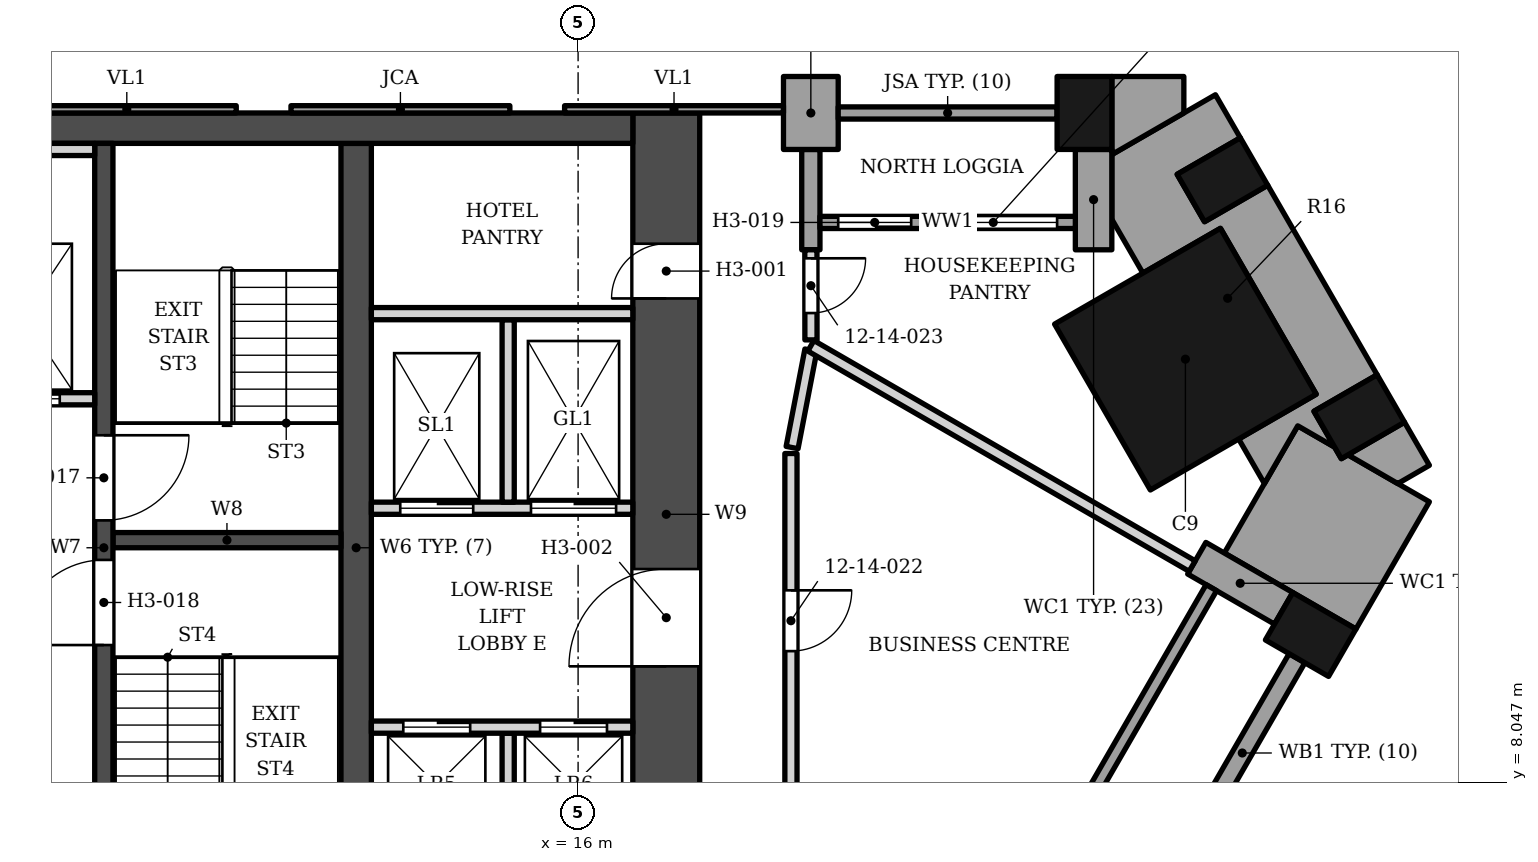
"""IFC4 building model, lengths in metres.
Left out: names, types, materials, properties, quantities, classifications, styles, units other than length and angle.
Written with IfcOpenShell. Run it as: python <this file> out.ifc"""

import sys

from ifc_helpers import new_model, si_unit, direction, frame, frame_2d, origin, origin_2d, place, context, subcontext, project, spatial, polyline, rectangle, outline, extrude, element, fill, save


model = new_model("IFC4")
c1 = context("Model", 3, precision=1e-05, world=origin(), true_north=direction((0.0, 1.0)))
c2 = subcontext(c1, "Body", "Model", "MODEL_VIEW")
j1 = project(units=[si_unit("LENGTHUNIT", "METRE"), si_unit("PLANEANGLEUNIT", "RADIAN")], contexts=[c1])
p1 = place(None, origin())
s1 = spatial("IfcSite", under=j1, at=p1, CompositionType="ELEMENT")
p2 = place(p1, origin())
s2 = spatial("IfcBuilding", under=s1, at=p2, CompositionType="ELEMENT")
p3 = place(p2, frame((0.0, 0.0, 66.4)))
s3 = spatial("IfcBuildingStorey", under=s2, at=p3, CompositionType="ELEMENT", Elevation=66.4)
p4 = place(p3, frame((-16.9, 18.802, 0.0), z_axis=(0.0, 0.0, 1.0), x_axis=(1.0, 0.0, 0.0)))
e1 = element("IfcWall", 1, at=p4, inside=s3, PredefinedType="SHEAR", context=c2, shape_type="SweptSolid", body=[
    extrude(rectangle(XDim=33.8, YDim=0.5, at=frame_2d((16.9, 0.0))), origin(), (0.0, 0.0, 1.0), 3.4),
])
p5 = place(p3, frame((12.35, 5.253, 0.0), z_axis=(0.0, 0.0, 1.0), x_axis=(0.0, 1.0, 0.0)))
e2 = element("IfcWall", 2, at=p5, inside=s3, PredefinedType="SHEAR", context=c2, shape_type="SweptSolid", body=[
    extrude(rectangle(XDim=13.3, YDim=0.5, at=frame_2d((6.65, 0.0))), origin(), (0.0, 0.0, 1.0), 3.4),
])
p6 = place(p3, frame((8.2, 5.253, 0.0), z_axis=(0.0, 0.0, 1.0), x_axis=(0.0, 1.0, 0.0)))
e3 = element("IfcWall", 3, at=p6, inside=s3, PredefinedType="SHEAR", context=c2, shape_type="SweptSolid", body=[
    extrude(rectangle(XDim=13.3, YDim=0.3, at=frame_2d((6.65, 0.0))), origin(), (0.0, 0.0, 1.0), 3.4),
])
p7 = place(p6, frame((7.1, 0.0, 0.0)))
e4 = element("IfcOpeningElement", 4, at=p7, cuts=e3, PredefinedType="OPENING", context=c2, shape_type="SweptSolid", body=[
    extrude(rectangle(XDim=1.4, YDim=2.1, at=frame_2d((0.7, 1.05))), frame((0.0, 0.16, 0.0), z_axis=(0.0, -1.0, 0.0), x_axis=(1.0, 0.0, 0.0)), (0.0, 0.0, 1.0), 0.32),
])
p8 = place(p6, frame((5.05, 0.0, 0.0)))
e5 = element("IfcOpeningElement", 5, at=p8, cuts=e3, PredefinedType="OPENING", context=c2, shape_type="SweptSolid", body=[
    extrude(rectangle(XDim=1.4, YDim=2.1, at=frame_2d((0.7, 1.05))), frame((0.0, 0.16, 0.0), z_axis=(0.0, -1.0, 0.0), x_axis=(1.0, 0.0, 0.0)), (0.0, 0.0, 1.0), 0.32),
])
p9 = place(p3, frame((8.35, 12.028, 0.0), z_axis=(0.0, 0.0, 1.0), x_axis=(1.0, 0.0, 0.0)))
e6 = element("IfcWall", 6, at=p9, inside=s3, PredefinedType="SHEAR", context=c2, shape_type="SweptSolid", body=[
    extrude(rectangle(XDim=3.75, YDim=0.25, at=frame_2d((1.875, 0.0))), origin(), (0.0, 0.0, 1.0), 3.4),
])
p10 = place(p3, frame((17.45, 5.853, 0.0), z_axis=(0.0, 0.0, 1.0), x_axis=(0.0, 1.0, 0.0)))
e7 = element("IfcWall", 7, at=p10, inside=s3, PredefinedType="SHEAR", context=c2, shape_type="SweptSolid", body=[
    extrude(rectangle(XDim=13.2, YDim=1.1, at=frame_2d((6.6, 0.0))), origin(), (0.0, 0.0, 1.0), 3.4),
])
p11 = place(p10, frame((4.1, 0.0, 0.0)))
e8 = element("IfcOpeningElement", 8, at=p11, cuts=e7, PredefinedType="OPENING", context=c2, shape_type="SweptSolid", body=[
    extrude(rectangle(XDim=1.6, YDim=2.1, at=frame_2d((0.8, 1.05))), frame((0.0, 0.56, 0.0), z_axis=(0.0, -1.0, 0.0), x_axis=(1.0, 0.0, 0.0)), (0.0, 0.0, 1.0), 1.12),
])
p12 = place(p10, frame((10.15, 0.0, 0.0)))
e9 = element("IfcOpeningElement", 9, at=p12, cuts=e7, PredefinedType="OPENING", context=c2, shape_type="SweptSolid", body=[
    extrude(rectangle(XDim=0.9, YDim=2.1, at=frame_2d((0.45, 1.05))), frame((0.0, 0.56, 0.0), z_axis=(0.0, -1.0, 0.0), x_axis=(1.0, 0.0, 0.0)), (0.0, 0.0, 1.0), 1.12),
])
p13 = place(p3, frame((25.988, 15.004, 0.0), z_axis=(0.0, 0.0, 1.0), x_axis=(-0.866025412511, -0.499999984885, 0.0)))
e10 = element("IfcColumn", 10, at=p13, inside=s3, PredefinedType="COLUMN", context=c2, shape_type="SweptSolid", body=[
    extrude(rectangle(XDim=3.15, YDim=3.15, at=origin_2d()), origin(), (0.0, 0.0, 1.0), 3.4),
])
for number, where, z_axis, x_axis in (
    (11, (28.048, 10.476, 0.0), (0.0, 0.0, 1.0), (0.5, 0.866, 0.0)),
    (12, (28.847, 14.057, 0.0), (0.0, 0.0, 1.0), (-0.5, 0.866, 0.0)),
    (13, (26.597, 17.954, 0.0), (0.0, 0.0, 1.0), (-0.5, 0.866, 0.0)),
    (14, (24.328, 19.053, 0.0), (0.0, 0.0, 1.0), (-1.0, 0.0, 0.0)),
):
    element("IfcColumn", number, at=place(p3, frame(where, z_axis=z_axis, x_axis=x_axis)), inside=s3, PredefinedType="COLUMN", context=c2, shape_type="SweptSolid", body=[
        extrude(rectangle(XDim=0.9, YDim=1.2, at=origin_2d()), origin(), (0.0, 0.0, 1.0), 3.4),
    ])
p14 = place(p3, frame((27.604, 10.906, 0.0), z_axis=(0.0, 0.0, 1.0), x_axis=(-0.866040211805, 0.499974350878, 0.0)))
e15 = element("IfcWall", 15, at=p14, inside=s3, PredefinedType="SOLIDWALL", context=c2, shape_type="SweptSolid", body=[
    extrude(rectangle(XDim=1.65, YDim=0.6, at=frame_2d((0.825, 0.0))), origin(), (0.0, 0.0, 1.0), 2.65),
])
p15 = place(p3, frame((26.023, 6.969, 0.0), z_axis=(0.0, 0.0, 1.0), x_axis=(0.499961193289, 0.866047807691, 0.0)))
e16 = element("IfcWall", 16, at=p15, inside=s3, PredefinedType="SOLIDWALL", context=c2, shape_type="SweptSolid", body=[
    extrude(rectangle(XDim=3.6, YDim=0.3, at=frame_2d((1.8, 0.0))), origin(), (0.0, 0.0, 1.0), 2.63),
])
p16 = place(p3, frame((24.314, 7.609, 0.0), z_axis=(0.0, 0.0, 1.0), x_axis=(0.500027713859, 0.866009402589, 0.0)))
e17 = element("IfcWall", 17, at=p16, inside=s3, PredefinedType="ELEMENTEDWALL", context=c2, shape_type="SweptSolid", body=[
    extrude(rectangle(XDim=4.2, YDim=0.2, at=frame_2d((2.1, 0.0))), origin(), (0.0, 0.0, 1.0), 2.65),
])
p17 = place(p3, origin())
e18 = element("IfcWall", 18, at=p17, inside=s3, PredefinedType="SOLIDWALL", context=c2, shape_type="SweptSolid", body=[
    extrude(outline(polyline([(24.778, 16.802), (24.778, 18.453), (24.178, 18.453), (24.178, 16.802), (24.778, 16.802)])), origin(), (0.0, 0.0, 1.0), 2.65),
])
p18 = place(p3, origin())
e19 = element("IfcWall", 19, at=p18, inside=s3, PredefinedType="SOLIDWALL", context=c2, shape_type="SweptSolid", body=[
    extrude(outline(polyline([(20.278, 19.653), (19.378, 19.653), (19.378, 18.453), (20.278, 18.453), (20.278, 19.653)])), origin(), (0.0, 0.0, 1.0), 2.65),
])
p19 = place(p3, origin())
e20 = element("IfcWall", 20, at=p19, inside=s3, PredefinedType="SOLIDWALL", context=c2, shape_type="SweptSolid", body=[
    extrude(outline(polyline([(19.678, 18.453), (19.678, 16.802), (19.978, 16.802), (19.978, 18.453), (19.678, 18.453)])), origin(), (0.0, 0.0, 1.0), 2.65),
])
p20 = place(p3, frame((23.878, 19.052, 0.0), z_axis=(0.0, 0.0, 1.0), x_axis=(-1.0, 0.0, 0.0)))
e21 = element("IfcWall", 21, at=p20, inside=s3, PredefinedType="SOLIDWALL", context=c2, shape_type="SweptSolid", body=[
    extrude(rectangle(XDim=3.6, YDim=0.2, at=frame_2d((1.8, 0.0))), origin(), (0.0, 0.0, 1.0), 2.65),
])
p21 = place(p3, frame((24.178, 17.252, 0.0), z_axis=(0.0, 0.0, 1.0), x_axis=(-1.0, 0.0, 0.0)))
e22 = element("IfcWall", 22, at=p21, inside=s3, PredefinedType="ELEMENTEDWALL", context=c2, shape_type="SweptSolid", body=[
    extrude(rectangle(XDim=4.2, YDim=0.2, at=frame_2d((2.1, 0.0))), origin(), (0.0, 0.0, 1.0), 2.65),
])
p22 = place(p21, frame((0.3, 0.0, 0.6)))
e23 = element("IfcOpeningElement", 23, at=p22, cuts=e22, PredefinedType="OPENING", context=c2, shape_type="SweptSolid", body=[
    extrude(rectangle(XDim=2.1, YDim=1.8, at=frame_2d((1.05, 0.9))), frame((0.0, 0.11, 0.0), z_axis=(0.0, -1.0, 0.0), x_axis=(1.0, 0.0, 0.0)), (0.0, 0.0, 1.0), 0.22),
])
p23 = place(p21, frame((2.7, 0.0, 0.0)))
e24 = element("IfcOpeningElement", 24, at=p23, cuts=e22, PredefinedType="OPENING", context=c2, shape_type="SweptSolid", body=[
    extrude(rectangle(XDim=1.2, YDim=2.4, at=frame_2d((0.6, 1.2))), frame((0.0, 0.11, 0.0), z_axis=(0.0, -1.0, 0.0), x_axis=(1.0, 0.0, 0.0)), (0.0, 0.0, 1.0), 0.22),
])
p24 = place(p3, origin())
e25 = element("IfcWall", 25, at=p24, inside=s3, PredefinedType="ELEMENTEDWALL", context=c2, shape_type="SweptSolid", body=[
    extrude(outline(polyline([(15.778, 19.173), (15.778, 19.052), (19.377, 19.052), (19.377, 19.173), (15.778, 19.173)])), origin(), (0.0, 0.0, 1.0), 2.65),
])
p25 = place(p3, origin())
e26 = element("IfcWall", 26, at=p25, inside=s3, PredefinedType="SOLIDWALL", context=c2, shape_type="SweptSolid", body=[
    extrude(outline(polyline([(11.278, 19.173), (11.278, 19.052), (14.878, 19.052), (14.878, 19.173), (11.278, 19.173)])), origin(), (0.0, 0.0, 1.0), 2.65),
])
p26 = place(p3, origin())
e27 = element("IfcWall", 27, at=p26, inside=s3, PredefinedType="ELEMENTEDWALL", context=c2, shape_type="SweptSolid", body=[
    extrude(outline(polyline([(6.778, 19.173), (6.778, 19.052), (10.378, 19.052), (10.378, 19.173), (6.778, 19.173)])), origin(), (0.0, 0.0, 1.0), 2.65),
])
p27 = place(p3, origin())
e28 = element("IfcWall", 28, at=p27, inside=s3, PredefinedType="SOLIDWALL", context=c2, shape_type="SweptSolid", body=[
    extrude(outline(polyline([(30.001, 12.658), (28.662, 13.431), (28.552, 13.367), (28.443, 13.558), (27.836, 13.908), (26.628, 11.816), (28.793, 10.566), (30.001, 12.658)])), origin(), (0.0, 0.0, 1.0), 2.63),
])
p28 = place(p3, origin())
e29 = element("IfcWall", 29, at=p28, inside=s3, PredefinedType="SOLIDWALL", context=c2, shape_type="SweptSolid", body=[
    extrude(outline(polyline([(29.481, 12.958), (30.001, 13.258), (29.591, 13.967), (28.662, 13.431), (29.481, 12.958)])), origin(), (0.0, 0.0, 1.0), 2.63),
])
p29 = place(p3, origin())
e30 = element("IfcWall", 30, at=p29, inside=s3, PredefinedType="SOLIDWALL", context=c2, shape_type="SweptSolid", body=[
    extrude(outline(polyline([(25.852, 18.044), (26.891, 18.644), (26.482, 19.353), (24.778, 18.369), (24.778, 17.304), (25.289, 16.419), (26.564, 17.156), (28.139, 14.427), (26.864, 13.691), (27.287, 12.958), (27.836, 13.908), (28.443, 13.558), (28.102, 14.147), (29.141, 14.747), (27.341, 17.864), (26.302, 17.264), (25.852, 18.044)])), origin(), (0.0, 0.0, 1.0), 2.63),
])
p30 = place(p3, origin())
e31 = element("IfcWall", 31, at=p30, inside=s3, PredefinedType="SOLIDWALL", context=c2, shape_type="SweptSolid", body=[
    extrude(outline(polyline([(24.778, 18.453), (24.778, 18.369), (25.962, 19.052), (25.962, 19.653), (24.778, 19.653), (24.778, 18.453), (24.778, 18.453)])), origin(), (0.0, 0.0, 1.0), 2.63),
])
p31 = place(p3, frame((14.85, 6.353, 0.0), z_axis=(0.0, 0.0, 1.0), x_axis=(0.0, 1.0, 0.0)))
e32 = element("IfcWall", 32, at=p31, inside=s3, PredefinedType="SOLIDWALL", context=c2, shape_type="SweptSolid", body=[
    extrude(rectangle(XDim=2.5, YDim=0.2, at=frame_2d((1.25, 0.0))), origin(), (0.0, 0.0, 1.0), 3.23),
])
p32 = place(p3, frame((12.6, 8.953, 0.0), z_axis=(0.0, 0.0, 1.0), x_axis=(1.0, 0.0, 0.0)))
e33 = element("IfcWall", 33, at=p32, inside=s3, PredefinedType="SOLIDWALL", context=c2, shape_type="SweptSolid", body=[
    extrude(rectangle(XDim=4.3, YDim=0.2, at=frame_2d((2.15, 0.0))), origin(), (0.0, 0.0, 1.0), 3.23),
])
p33 = place(p32, frame((0.525, 0.0, 0.0)))
e34 = element("IfcOpeningElement", 34, at=p33, cuts=e33, PredefinedType="OPENING", context=c2, shape_type="SweptSolid", body=[
    extrude(rectangle(XDim=1.1, YDim=2.1, at=frame_2d((0.55, 1.05))), frame((0.0, 0.11, 0.0), z_axis=(0.0, -1.0, 0.0), x_axis=(1.0, 0.0, 0.0)), (0.0, 0.0, 1.0), 0.22),
])
p34 = place(p32, frame((2.775, 0.0, 0.0)))
e35 = element("IfcOpeningElement", 35, at=p34, cuts=e33, PredefinedType="OPENING", context=c2, shape_type="SweptSolid", body=[
    extrude(rectangle(XDim=1.1, YDim=2.1, at=frame_2d((0.55, 1.05))), frame((0.0, 0.11, 0.0), z_axis=(0.0, -1.0, 0.0), x_axis=(1.0, 0.0, 0.0)), (0.0, 0.0, 1.0), 0.22),
])
p35 = place(p3, frame((12.6, 12.552, 0.0), z_axis=(0.0, 0.0, 1.0), x_axis=(1.0, 0.0, 0.0)))
e36 = element("IfcWall", 36, at=p35, inside=s3, PredefinedType="SOLIDWALL", context=c2, shape_type="SweptSolid", body=[
    extrude(rectangle(XDim=4.3, YDim=0.2, at=frame_2d((2.15, 0.0))), origin(), (0.0, 0.0, 1.0), 3.23),
])
p36 = place(p35, frame((0.475, 0.0, 0.0)))
e37 = element("IfcOpeningElement", 37, at=p36, cuts=e36, PredefinedType="OPENING", context=c2, shape_type="SweptSolid", body=[
    extrude(rectangle(XDim=1.2, YDim=2.1, at=frame_2d((0.6, 1.05))), frame((0.0, 0.11, 0.0), z_axis=(0.0, -1.0, 0.0), x_axis=(1.0, 0.0, 0.0)), (0.0, 0.0, 1.0), 0.22),
])
p37 = place(p35, frame((2.625, 0.0, 0.0)))
e38 = element("IfcOpeningElement", 38, at=p37, cuts=e36, PredefinedType="OPENING", context=c2, shape_type="SweptSolid", body=[
    extrude(rectangle(XDim=1.4, YDim=2.1, at=frame_2d((0.7, 1.05))), frame((0.0, 0.11, 0.0), z_axis=(0.0, -1.0, 0.0), x_axis=(1.0, 0.0, 0.0)), (0.0, 0.0, 1.0), 0.22),
])
p38 = place(p3, frame((14.85, 12.653, 0.0), z_axis=(0.0, 0.0, 1.0), x_axis=(0.0, 1.0, 0.0)))
e39 = element("IfcWall", 39, at=p38, inside=s3, PredefinedType="SOLIDWALL", context=c2, shape_type="SweptSolid", body=[
    extrude(rectangle(XDim=3.0, YDim=0.2, at=frame_2d((1.5, 0.0))), origin(), (0.0, 0.0, 1.0), 3.23),
])
p39 = place(p3, frame((5.3, 14.353, 0.0), z_axis=(0.0, 0.0, 1.0), x_axis=(1.0, 0.0, 0.0)))
e40 = element("IfcWall", 40, at=p39, inside=s3, PredefinedType="SOLIDWALL", context=c2, shape_type="SweptSolid", body=[
    extrude(rectangle(XDim=2.75, YDim=0.2, at=frame_2d((1.375, 0.0))), origin(), (0.0, 0.0, 1.0), 3.23),
])
p40 = place(p39, frame((0.975, 0.0, 0.0)))
e41 = element("IfcOpeningElement", 41, at=p40, cuts=e40, PredefinedType="OPENING", context=c2, shape_type="SweptSolid", body=[
    extrude(rectangle(XDim=1.2, YDim=2.1, at=frame_2d((0.6, 1.05))), frame((0.0, 0.11, 0.0), z_axis=(0.0, -1.0, 0.0), x_axis=(1.0, 0.0, 0.0)), (0.0, 0.0, 1.0), 0.22),
])
p41 = place(p3, frame((12.6, 15.753, 0.0), z_axis=(0.0, 0.0, 1.0), x_axis=(1.0, 0.0, 0.0)))
e42 = element("IfcWall", 42, at=p41, inside=s3, PredefinedType="SOLIDWALL", context=c2, shape_type="SweptSolid", body=[
    extrude(rectangle(XDim=4.3, YDim=0.2, at=frame_2d((2.15, 0.0))), origin(), (0.0, 0.0, 1.0), 3.23),
])
p42 = place(p3, frame((5.5, 18.453, 0.0), z_axis=(0.0, 0.0, 1.0), x_axis=(1.0, 0.0, 0.0)))
e43 = element("IfcWall", 43, at=p42, inside=s3, PredefinedType="SOLIDWALL", context=c2, shape_type="SweptSolid", body=[
    extrude(rectangle(XDim=2.55, YDim=0.2, at=frame_2d((1.275, 0.0))), origin(), (0.0, 0.0, 1.0), 3.23),
])
p43 = place(p3, frame((19.5, 7.953, 0.0), z_axis=(0.0, 0.0, 1.0), x_axis=(0.0, 1.0, 0.0)))
e44 = element("IfcWall", 44, at=p43, inside=s3, PredefinedType="PARTITIONING", context=c2, shape_type="SweptSolid", body=[
    extrude(rectangle(XDim=5.5, YDim=0.2, at=frame_2d((2.75, 0.0))), origin(), (0.0, 0.0, 1.0), 3.23),
])
p44 = place(p43, frame((2.25, 0.0, 0.0)))
e45 = element("IfcOpeningElement", 45, at=p44, cuts=e44, PredefinedType="OPENING", context=c2, shape_type="SweptSolid", body=[
    extrude(rectangle(XDim=1.0, YDim=2.1, at=frame_2d((0.5, 1.05))), frame((0.0, 0.11, 0.0), z_axis=(0.0, -1.0, 0.0), x_axis=(1.0, 0.0, 0.0)), (0.0, 0.0, 1.0), 0.22),
])
p45 = place(p3, frame((19.519, 13.551, 0.0), z_axis=(0.0, 0.0, 1.0), x_axis=(0.18946348331, 0.981887767768, 0.0)))
e46 = element("IfcWall", 46, at=p45, inside=s3, PredefinedType="PARTITIONING", context=c2, shape_type="SweptSolid", body=[
    extrude(rectangle(XDim=1.631, YDim=0.2, at=frame_2d((0.816, 0.0))), origin(), (0.0, 0.0, 1.0), 3.23),
])
p46 = place(p3, frame((19.829, 15.224, 0.0), z_axis=(0.0, 0.0, 1.0), x_axis=(0.865914392541, -0.50019222784, 0.0)))
e47 = element("IfcWall", 47, at=p46, inside=s3, PredefinedType="PARTITIONING", context=c2, shape_type="SweptSolid", body=[
    extrude(rectangle(XDim=7.242, YDim=0.2, at=frame_2d((3.621, 0.0))), origin(), (0.0, 0.0, 1.0), 3.23),
])
p47 = place(p3, frame((19.828, 16.802, 0.0), z_axis=(0.0, 0.0, 1.0), x_axis=(0.000988793188, -0.999999511144, 0.0)))
e48 = element("IfcWall", 48, at=p47, inside=s3, PredefinedType="PARTITIONING", context=c2, shape_type="SweptSolid", body=[
    extrude(rectangle(XDim=1.481, YDim=0.2, at=frame_2d((0.741, 0.0))), origin(), (0.0, 0.0, 1.0), 3.23),
])
p48 = place(p47, frame((0.14, 0.0, 0.0)))
e49 = element("IfcOpeningElement", 49, at=p48, cuts=e48, PredefinedType="OPENING", context=c2, shape_type="SweptSolid", body=[
    extrude(rectangle(XDim=0.9, YDim=2.1, at=frame_2d((0.45, 1.05))), frame((0.0, 0.11, 0.0), z_axis=(0.0, -1.0, 0.0), x_axis=(1.0, 0.0, 0.0)), (0.0, 0.0, 1.0), 0.22),
])
p49 = place(p22, origin())
e50 = element("IfcWindow", 50, at=p49, inside=s3, PartitioningType="SINGLE_PANEL", PredefinedType="WINDOW", context=c2, shape_type="SweptSolid", body=[
    extrude(rectangle(XDim=2.1, YDim=1.8, at=frame_2d((1.05, 0.9))), frame((0.0, 0.03, 0.0), z_axis=(0.0, -1.0, 0.0), x_axis=(1.0, 0.0, 0.0)), (0.0, 0.0, 1.0), 0.06),
])
fill(e23, e50)
p50 = place(p23, origin())
e51 = element("IfcDoor", 51, at=p50, inside=s3, OperationType="SINGLE_SWING_LEFT", PredefinedType="DOOR", context=c2, shape_type="SweptSolid", body=[
    extrude(rectangle(XDim=1.2, YDim=2.4, at=frame_2d((0.6, 1.2))), frame((0.0, 0.025, 0.0), z_axis=(0.0, -1.0, 0.0), x_axis=(1.0, 0.0, 0.0)), (0.0, 0.0, 1.0), 0.05),
])
fill(e24, e51)
p51 = place(p40, origin())
e52 = element("IfcDoor", 52, at=p51, inside=s3, OperationType="DOUBLE_DOOR_SLIDING", PredefinedType="DOOR", context=c2, shape_type="SweptSolid", body=[
    extrude(rectangle(XDim=1.2, YDim=2.1, at=frame_2d((0.6, 1.05))), frame((0.0, 0.025, 0.0), z_axis=(0.0, -1.0, 0.0), x_axis=(1.0, 0.0, 0.0)), (0.0, 0.0, 1.0), 0.05),
])
fill(e41, e52)
p52 = place(p33, origin())
e53 = element("IfcDoor", 53, at=p52, inside=s3, OperationType="DOUBLE_DOOR_SLIDING", PredefinedType="DOOR", context=c2, shape_type="SweptSolid", body=[
    extrude(rectangle(XDim=1.1, YDim=2.1, at=frame_2d((0.55, 1.05))), frame((0.0, 0.025, 0.0), z_axis=(0.0, -1.0, 0.0), x_axis=(1.0, 0.0, 0.0)), (0.0, 0.0, 1.0), 0.05),
])
fill(e34, e53)
p53 = place(p34, origin())
e54 = element("IfcDoor", 54, at=p53, inside=s3, OperationType="DOUBLE_DOOR_SLIDING", PredefinedType="DOOR", context=c2, shape_type="SweptSolid", body=[
    extrude(rectangle(XDim=1.1, YDim=2.1, at=frame_2d((0.55, 1.05))), frame((0.0, 0.025, 0.0), z_axis=(0.0, -1.0, 0.0), x_axis=(1.0, 0.0, 0.0)), (0.0, 0.0, 1.0), 0.05),
])
fill(e35, e54)
p54 = place(p36, origin())
e55 = element("IfcDoor", 55, at=p54, inside=s3, OperationType="DOUBLE_DOOR_SLIDING", PredefinedType="DOOR", context=c2, shape_type="SweptSolid", body=[
    extrude(rectangle(XDim=1.2, YDim=2.1, at=frame_2d((0.6, 1.05))), frame((0.0, 0.025, 0.0), z_axis=(0.0, -1.0, 0.0), x_axis=(1.0, 0.0, 0.0)), (0.0, 0.0, 1.0), 0.05),
])
fill(e37, e55)
p55 = place(p37, origin())
e56 = element("IfcDoor", 56, at=p55, inside=s3, OperationType="DOUBLE_DOOR_SLIDING", PredefinedType="DOOR", context=c2, shape_type="SweptSolid", body=[
    extrude(rectangle(XDim=1.4, YDim=2.1, at=frame_2d((0.7, 1.05))), frame((0.0, 0.025, 0.0), z_axis=(0.0, -1.0, 0.0), x_axis=(1.0, 0.0, 0.0)), (0.0, 0.0, 1.0), 0.05),
])
fill(e38, e56)
p56 = place(p7, origin())
e57 = element("IfcDoor", 57, at=p56, inside=s3, OperationType="SINGLE_SWING_RIGHT", PredefinedType="DOOR", context=c2, shape_type="SweptSolid", body=[
    extrude(rectangle(XDim=1.4, YDim=2.1, at=frame_2d((0.7, 1.05))), frame((0.0, 0.025, 0.0), z_axis=(0.0, -1.0, 0.0), x_axis=(1.0, 0.0, 0.0)), (0.0, 0.0, 1.0), 0.05),
])
fill(e4, e57)
p57 = place(p8, origin())
e58 = element("IfcDoor", 58, at=p57, inside=s3, OperationType="SINGLE_SWING_LEFT", PredefinedType="DOOR", context=c2, shape_type="SweptSolid", body=[
    extrude(rectangle(XDim=1.4, YDim=2.1, at=frame_2d((0.7, 1.05))), frame((0.0, 0.025, 0.0), z_axis=(0.0, -1.0, 0.0), x_axis=(1.0, 0.0, 0.0)), (0.0, 0.0, 1.0), 0.05),
])
fill(e5, e58)
p58 = place(p11, origin())
e59 = element("IfcDoor", 59, at=p58, inside=s3, OperationType="DOUBLE_DOOR_SINGLE_SWING", PredefinedType="DOOR", context=c2, shape_type="SweptSolid", body=[
    extrude(rectangle(XDim=1.6, YDim=2.1, at=frame_2d((0.8, 1.05))), frame((0.0, 0.275, 0.0), z_axis=(0.0, -1.0, 0.0), x_axis=(1.0, 0.0, 0.0)), (0.0, 0.0, 1.0), 0.05),
])
fill(e8, e59)
p59 = place(p12, origin())
e60 = element("IfcDoor", 60, at=p59, inside=s3, OperationType="SINGLE_SWING_LEFT", PredefinedType="DOOR", context=c2, shape_type="SweptSolid", body=[
    extrude(rectangle(XDim=0.9, YDim=2.1, at=frame_2d((0.45, 1.05))), frame((0.0, 0.275, 0.0), z_axis=(0.0, -1.0, 0.0), x_axis=(1.0, 0.0, 0.0)), (0.0, 0.0, 1.0), 0.05),
])
fill(e9, e60)
p60 = place(p44, origin())
e61 = element("IfcDoor", 61, at=p60, inside=s3, OperationType="SINGLE_SWING_RIGHT", PredefinedType="DOOR", context=c2, shape_type="SweptSolid", body=[
    extrude(rectangle(XDim=1.0, YDim=2.1, at=frame_2d((0.5, 1.05))), frame((0.0, 0.025, 0.0), z_axis=(0.0, -1.0, 0.0), x_axis=(1.0, 0.0, 0.0)), (0.0, 0.0, 1.0), 0.05),
])
fill(e45, e61)
p61 = place(p48, origin())
e62 = element("IfcDoor", 62, at=p61, inside=s3, OperationType="SINGLE_SWING_LEFT", PredefinedType="DOOR", context=c2, shape_type="SweptSolid", body=[
    extrude(rectangle(XDim=0.9, YDim=2.1, at=frame_2d((0.45, 1.05))), frame((0.0, 0.025, 0.0), z_axis=(0.0, -1.0, 0.0), x_axis=(1.0, 0.0, 0.0)), (0.0, 0.0, 1.0), 0.05),
])
fill(e49, e62)
save(model, sys.argv[1])
